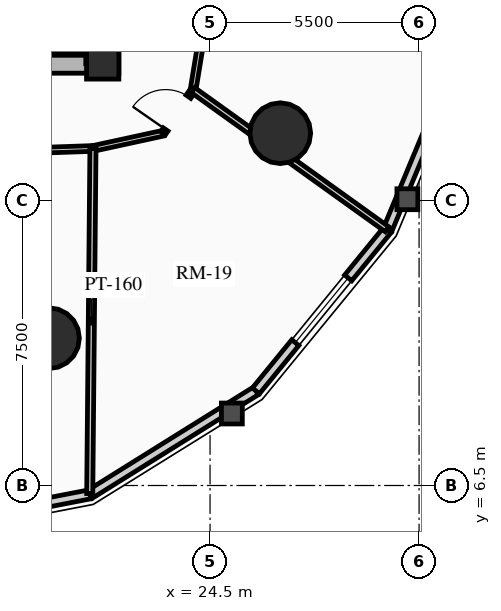
"""IFC4 building model, lengths in metres.
Left out: names, types, materials, properties, quantities, classifications, styles, units other than length and angle.
Written with IfcOpenShell. Run it as: python <this file> out.ifc"""

import sys

from ifc_helpers import new_model, si_unit, direction, frame, frame_2d, origin, origin_2d, place, context, subcontext, project, spatial, rectangle, circle, extrude, source, transform, mapped, element, fill, save


model = new_model("IFC4")
c1 = context("Model", 3, precision=1e-05, world=origin(), true_north=direction((0.0, 1.0)))
c2 = subcontext(c1, "Body", "Model", "MODEL_VIEW")
j1 = project(units=[si_unit("LENGTHUNIT", "METRE"), si_unit("PLANEANGLEUNIT", "RADIAN")], contexts=[c1])
p1 = place(None, origin())
s1 = spatial("IfcSite", under=j1, at=p1, CompositionType="ELEMENT")
p2 = place(p1, origin())
s2 = spatial("IfcBuilding", under=s1, at=p2, CompositionType="ELEMENT")
p3 = place(p2, frame((0.0, 0.0, 62.74)))
s3 = spatial("IfcBuildingStorey", under=s2, at=p3, CompositionType="ELEMENT", Elevation=62.74)
p4 = place(p3, frame((21.85, 17.35, 0.0), z_axis=(0.0, 0.0, 1.0), x_axis=(0.0, 1.0, 0.0)))
e1 = element("IfcWall", 1, at=p4, inside=s3, PredefinedType="SHEAR", context=c2, shape_type="SweptSolid", body=[
    extrude(rectangle(XDim=14.3, YDim=0.5, at=frame_2d((7.15, 0.0))), origin(), (0.0, 0.0, 1.0), 2.91),
])
p5 = place(p3, frame((11.15, 17.6, 0.0), z_axis=(0.0, 0.0, 1.0), x_axis=(1.0, 0.0, 0.0)))
e2 = element("IfcWall", 2, at=p5, inside=s3, PredefinedType="SHEAR", context=c2, shape_type="SweptSolid", body=[
    extrude(rectangle(XDim=10.7, YDim=0.5, at=frame_2d((5.35, 0.0))), origin(), (0.0, 0.0, 1.0), 2.91),
])
m1 = source(origin(), c2, "Body", "SweptSolid", [
    extrude(rectangle(XDim=1.5, YDim=2.02, at=frame_2d((0.75, 1.01))), frame((0.0, 0.26, 0.0), z_axis=(0.0, -1.0, 0.0), x_axis=(1.0, 0.0, 0.0)), (0.0, 0.0, 1.0), 0.52),
])
p6 = place(p5, frame((5.45, 0.0, 0.0)))
e3 = element("IfcOpeningElement", 3, at=p6, cuts=e2, PredefinedType="OPENING", context=c2, shape_type="MappedRepresentation", body=[
    mapped(m1, transform((0.0, 0.0, 0.0), x_axis=(1.0, 0.0, 0.0), y_axis=(0.0, 1.0, 0.0), z_axis=(0.0, 0.0, 1.0), scale=1.0)),
])
p7 = place(p3, frame((21.405, 17.6, 0.0), z_axis=(0.0, 0.0, 1.0), x_axis=(0.0, 1.0, 0.0)))
e4 = element("IfcWall", 4, at=p7, inside=s3, PredefinedType="SHEAR", context=c2, shape_type="SweptSolid", body=[
    extrude(rectangle(XDim=6.745, YDim=0.35, at=frame_2d((3.373, 0.0))), origin(), (0.0, 0.0, 1.0), 2.91),
])
p8 = place(p3, frame((21.675, 17.62, 0.0), z_axis=(0.0, 0.0, 1.0), x_axis=(1.0, 0.0, 0.0)))
e5 = element("IfcColumn", 5, at=p8, inside=s3, PredefinedType="COLUMN", context=c2, shape_type="SweptSolid", body=[
    extrude(rectangle(XDim=0.85, YDim=0.85, at=origin_2d()), origin(), (0.0, 0.0, 1.0), 2.91),
])
for number, where, z_axis, x_axis in (
    (6, (20.261, 10.377, 0.0), (0.0, 0.0, 1.0), (1.0, 0.0, 0.0)),
    (7, (26.347, 15.771, 0.0), (0.0, 0.0, 1.0), (1.0, 0.0, 0.0)),
):
    element("IfcColumn", number, at=place(p3, frame(where, z_axis=z_axis, x_axis=x_axis)), inside=s3, PredefinedType="USERDEFINED", context=c2, shape_type="SweptSolid", body=[
        extrude(circle(Radius=0.8, at=origin_2d()), origin(), (0.0, 0.0, 1.0), 2.91),
    ])
p9 = place(p3, frame((21.34, 6.268, 0.0), z_axis=(0.0, 0.0, 1.0), x_axis=(-0.981725274071, -0.190303668512, 0.0)))
e8 = element("IfcWall", 8, at=p9, inside=s3, PredefinedType="SOLIDWALL", context=c2, shape_type="SweptSolid", body=[
    extrude(rectangle(XDim=4.93, YDim=0.24, at=frame_2d((2.465, 0.0))), origin(), (0.0, 0.0, 1.0), 2.079),
])
m2 = source(origin(), c2, "Body", "SweptSolid", [
    extrude(rectangle(XDim=1.9, YDim=1.35, at=frame_2d((0.95, 0.675))), frame((0.0, 0.13, 0.0), z_axis=(0.0, -1.0, 0.0), x_axis=(1.0, 0.0, 0.0)), (0.0, 0.0, 1.0), 0.26),
])
p10 = place(p9, frame((1.515, 0.0, 0.65)))
e9 = element("IfcOpeningElement", 9, at=p10, cuts=e8, PredefinedType="OPENING", context=c2, shape_type="MappedRepresentation", body=[
    mapped(m2, transform((0.0, 0.0, 0.0), x_axis=(1.0, 0.0, 0.0), y_axis=(0.0, 1.0, 0.0), z_axis=(0.0, 0.0, 1.0), scale=1.0)),
])
p11 = place(p3, frame((25.707, 8.991, 0.0), z_axis=(0.0, 0.0, 1.0), x_axis=(-0.848533613342, -0.529141481107, 0.0)))
e10 = element("IfcWall", 10, at=p11, inside=s3, PredefinedType="SOLIDWALL", context=c2, shape_type="SweptSolid", body=[
    extrude(rectangle(XDim=5.146, YDim=0.24, at=frame_2d((2.573, 0.0))), origin(), (0.0, 0.0, 1.0), 2.079),
])
p12 = place(p3, frame((29.172, 13.232, 0.0), z_axis=(0.0, 0.0, 1.0), x_axis=(-0.632713287022, -0.77438614168, 0.0)))
e11 = element("IfcWall", 11, at=p12, inside=s3, PredefinedType="SOLIDWALL", context=c2, shape_type="SweptSolid", body=[
    extrude(rectangle(XDim=5.477, YDim=0.24, at=frame_2d((2.738, 0.0))), origin(), (0.0, 0.0, 1.0), 2.079),
])
m3 = source(origin(), c2, "Body", "SweptSolid", [
    extrude(rectangle(XDim=2.2, YDim=1.35, at=frame_2d((1.1, 0.675))), frame((0.0, 0.13, 0.0), z_axis=(0.0, -1.0, 0.0), x_axis=(1.0, 0.0, 0.0)), (0.0, 0.0, 1.0), 0.26),
])
p13 = place(p12, frame((1.638, 0.0, 0.65)))
e12 = element("IfcOpeningElement", 12, at=p13, cuts=e11, PredefinedType="OPENING", context=c2, shape_type="MappedRepresentation", body=[
    mapped(m3, transform((0.0, 0.0, 0.0), x_axis=(1.0, 0.0, 0.0), y_axis=(0.0, 1.0, 0.0), z_axis=(0.0, 0.0, 1.0), scale=1.0)),
])
p14 = place(p3, frame((31.396, 18.576, 0.0), z_axis=(0.0, 0.0, 1.0), x_axis=(-0.384348836956, -0.923187939442, 0.0)))
e13 = element("IfcWall", 13, at=p14, inside=s3, PredefinedType="SOLIDWALL", context=c2, shape_type="SweptSolid", body=[
    extrude(rectangle(XDim=5.789, YDim=0.24, at=frame_2d((2.894, 0.0))), origin(), (0.0, 0.0, 1.0), 2.079),
])
p15 = place(p3, frame((14.781, 15.141, 0.0), z_axis=(0.0, 0.0, 1.0), x_axis=(0.999407918707, 0.034406569513, 0.0)))
e14 = element("IfcWall", 14, at=p15, inside=s3, PredefinedType="PARTITIONING", context=c2, shape_type="SweptSolid", body=[
    extrude(rectangle(XDim=6.642, YDim=0.15, at=frame_2d((3.321, 0.0))), origin(), (0.0, 0.0, 1.0), 2.079),
])
p16 = place(p3, frame((21.419, 15.369, 0.0), z_axis=(0.0, 0.0, 1.0), x_axis=(0.977192701953, 0.212354475464, 0.0)))
e15 = element("IfcWall", 15, at=p16, inside=s3, PredefinedType="PARTITIONING", context=c2, shape_type="SweptSolid", body=[
    extrude(rectangle(XDim=1.888, YDim=0.15, at=frame_2d((0.944, 0.0))), origin(), (0.0, 0.0, 1.0), 2.125),
])
p17 = place(p3, frame((23.263, 15.77, 0.0), z_axis=(0.0, 0.0, 1.0), x_axis=(0.570743456919, 0.821128434768, 0.0)))
e16 = element("IfcWall", 16, at=p17, inside=s3, PredefinedType="PARTITIONING", context=c2, shape_type="SweptSolid", body=[
    extrude(rectangle(XDim=1.382, YDim=0.15, at=frame_2d((0.691, 0.0))), origin(), (0.0, 0.0, 1.0), 2.079),
])
m4 = source(origin(), c2, "Body", "SweptSolid", [
    extrude(rectangle(XDim=1.05, YDim=2.015, at=frame_2d((0.525, 1.007))), frame((0.0, 0.085, 0.0), z_axis=(0.0, -1.0, 0.0), x_axis=(1.0, 0.0, 0.0)), (0.0, 0.0, 1.0), 0.17),
])
p18 = place(p17, frame((0.12, 0.0, 0.0)))
e17 = element("IfcOpeningElement", 17, at=p18, cuts=e16, PredefinedType="OPENING", context=c2, shape_type="MappedRepresentation", body=[
    mapped(m4, transform((0.0, 0.0, 0.0), x_axis=(1.0, 0.0, 0.0), y_axis=(0.0, 1.0, 0.0), z_axis=(0.0, 0.0, 1.0), scale=1.0)),
])
p19 = place(p3, frame((24.052, 16.905, 0.0), z_axis=(0.0, 0.0, 1.0), x_axis=(0.162091534225, 0.986775726562, 0.0)))
e18 = element("IfcWall", 18, at=p19, inside=s3, PredefinedType="PARTITIONING", context=c2, shape_type="SweptSolid", body=[
    extrude(rectangle(XDim=1.613, YDim=0.15, at=frame_2d((0.807, 0.0))), origin(), (0.0, 0.0, 1.0), 2.125),
])
p20 = place(p3, frame((21.419, 15.369, 0.0), z_axis=(0.0, 0.0, 1.0), x_axis=(-0.009327801925, -0.999956495109, 0.0)))
e19 = element("IfcWall", 19, at=p20, inside=s3, PredefinedType="PARTITIONING", context=c2, shape_type="SweptSolid", body=[
    extrude(rectangle(XDim=9.082, YDim=0.16, at=frame_2d((4.541, 0.0))), origin(), (0.0, 0.0, 1.0), 2.079),
])
p21 = place(p3, frame((24.052, 16.905, 0.0), z_axis=(0.0, 0.0, 1.0), x_axis=(0.812581474608, -0.582847619129, 0.0)))
e20 = element("IfcWall", 20, at=p21, inside=s3, PredefinedType="PARTITIONING", context=c2, shape_type="SweptSolid", body=[
    extrude(rectangle(XDim=6.281, YDim=0.16, at=frame_2d((3.14, 0.0))), origin(), (0.0, 0.0, 1.0), 2.079),
])
m5 = source(origin(), c2, "Body", "SweptSolid", [
    extrude(rectangle(XDim=2.2, YDim=1.35, at=frame_2d((1.1, 0.675))), frame((0.0, 0.03, 0.0), z_axis=(0.0, -1.0, 0.0), x_axis=(1.0, 0.0, 0.0)), (0.0, 0.0, 1.0), 0.06),
])
p22 = place(p13, origin())
e21 = element("IfcWindow", 21, at=p22, inside=s3, PartitioningType="DOUBLE_PANEL_VERTICAL", PredefinedType="WINDOW", context=c2, shape_type="MappedRepresentation", body=[
    mapped(m5, transform((0.0, 0.0, 0.0), x_axis=(1.0, 0.0, 0.0), y_axis=(0.0, 1.0, 0.0), z_axis=(0.0, 0.0, 1.0), scale=1.0)),
])
fill(e12, e21)
m6 = source(origin(), c2, "Body", "SweptSolid", [
    extrude(rectangle(XDim=1.05, YDim=2.015, at=frame_2d((0.525, 1.007))), frame((0.0, 0.025, 0.0), z_axis=(0.0, -1.0, 0.0), x_axis=(1.0, 0.0, 0.0)), (0.0, 0.0, 1.0), 0.05),
])
p23 = place(p18, origin())
e22 = element("IfcDoor", 22, at=p23, inside=s3, OperationType="SINGLE_SWING_LEFT", PredefinedType="DOOR", context=c2, shape_type="MappedRepresentation", body=[
    mapped(m6, transform((0.0, 0.0, 0.0), x_axis=(1.0, 0.0, 0.0), y_axis=(0.0, 1.0, 0.0), z_axis=(0.0, 0.0, 1.0), scale=1.0)),
])
fill(e17, e22)
save(model, sys.argv[1])
